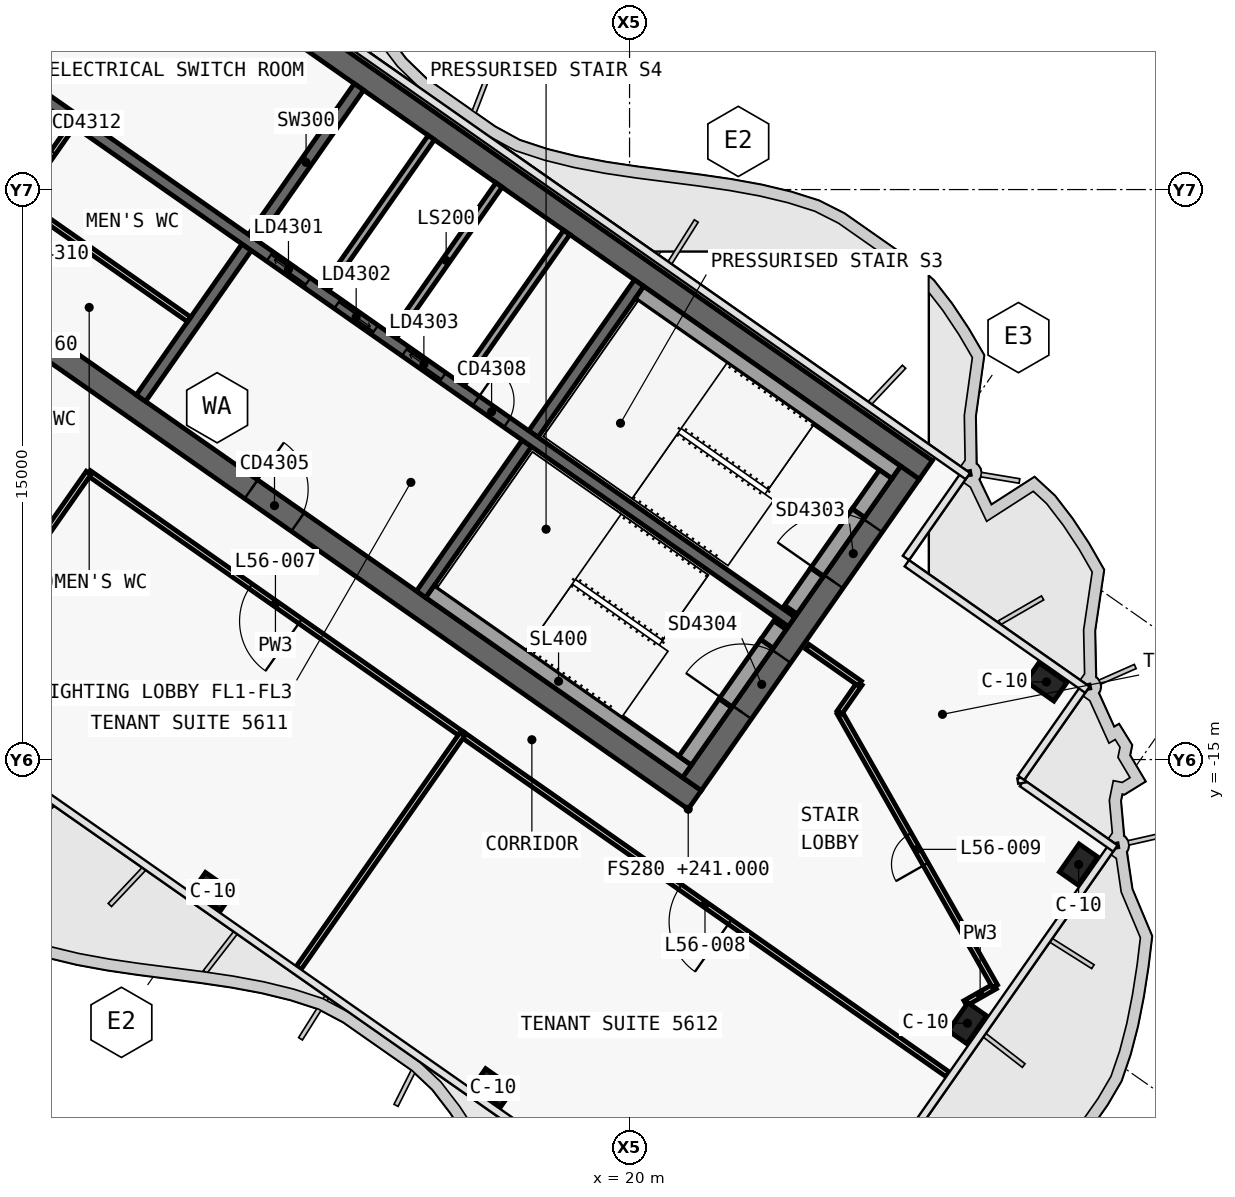
"""IFC4 building model, lengths in metres.
Left out: names, types, materials, properties, quantities, classifications, styles, units other than length and angle.
Written with IfcOpenShell. Run it as: python <this file> out.ifc"""

import sys

from ifc_helpers import new_model, si_unit, direction, frame, frame_2d, origin, origin_2d, place, context, subcontext, project, spatial, polyline, rectangle, outline, extrude, element, fill, save


model = new_model("IFC4")
c1 = context("Model", 3, precision=1e-05, world=origin(), true_north=direction((0.0, 1.0)))
c2 = subcontext(c1, "Body", "Model", "MODEL_VIEW")
j1 = project(units=[si_unit("LENGTHUNIT", "METRE"), si_unit("PLANEANGLEUNIT", "RADIAN")], contexts=[c1])
p1 = place(None, origin())
s1 = spatial("IfcSite", under=j1, at=p1, CompositionType="ELEMENT")
p2 = place(p1, origin())
s2 = spatial("IfcBuilding", under=s1, at=p2, CompositionType="ELEMENT")
p3 = place(p2, frame((0.0, 0.0, 241.0)))
s3 = spatial("IfcBuildingStorey", under=s2, at=p3, CompositionType="ELEMENT", Elevation=241.0)
p4 = place(p3, frame((0.028, 12.066, 0.0), z_axis=(0.0, 0.0, 1.0), x_axis=(0.819151382952, -0.573577380837, 0.0)))
e1 = element("IfcWall", 1, at=p4, inside=s3, PredefinedType="SHEAR", context=c2, shape_type="SweptSolid", body=[
    extrude(outline(polyline([(33.898, 0.3), (0.0, 0.3), (0.42, -0.3), (33.898, -0.3), (33.898, 0.3)])), origin(), (0.0, 0.0, 1.0), 3.9),
])
p5 = place(p3, frame((0.028, -0.874, 0.0), z_axis=(0.0, 0.0, 1.0), x_axis=(0.819150035022, -0.573579305871, 0.0)))
e2 = element("IfcWall", 2, at=p5, inside=s3, PredefinedType="SHEAR", context=c2, shape_type="SweptSolid", body=[
    extrude(outline(polyline([(26.476, 0.3), (0.0, 0.3), (0.42, -0.3), (26.476, -0.3), (26.476, 0.3)])), origin(), (0.0, 0.0, 1.0), 3.9),
])
p6 = place(p5, frame((0.826, 0.0, 0.0)))
e3 = element("IfcOpeningElement", 3, at=p6, cuts=e2, PredefinedType="OPENING", context=c2, shape_type="SweptSolid", body=[
    extrude(rectangle(XDim=1.5, YDim=2.1, at=frame_2d((0.75, 1.05))), frame((0.0, 0.31, 0.0), z_axis=(0.0, -1.0, 0.0), x_axis=(1.0, 0.0, 0.0)), (0.0, 0.0, 1.0), 0.62),
])
p7 = place(p5, frame((12.226, 0.0, 0.0)))
e4 = element("IfcOpeningElement", 4, at=p7, cuts=e2, PredefinedType="OPENING", context=c2, shape_type="SweptSolid", body=[
    extrude(rectangle(XDim=1.5, YDim=2.1, at=frame_2d((0.75, 1.05))), frame((0.0, 0.31, 0.0), z_axis=(0.0, -1.0, 0.0), x_axis=(1.0, 0.0, 0.0)), (0.0, 0.0, 1.0), 0.62),
])
p8 = place(p3, frame((21.642, -15.642, 0.0), z_axis=(0.0, 0.0, 1.0), x_axis=(0.573586866468, 0.819144740944, 0.0)))
e5 = element("IfcWall", 5, at=p8, inside=s3, PredefinedType="SHEAR", context=c2, shape_type="SweptSolid", body=[
    extrude(outline(polyline([(10.0, 0.3), (0.0, 0.3), (0.0, -0.3), (10.0, -0.3), (10.0, 0.3)])), origin(), (0.0, 0.0, 1.0), 3.9),
])
p9 = place(p8, frame((6.5, 0.0, 0.0)))
e6 = element("IfcOpeningElement", 6, at=p9, cuts=e5, PredefinedType="OPENING", context=c2, shape_type="SweptSolid", body=[
    extrude(rectangle(XDim=1.8, YDim=2.1, at=frame_2d((0.9, 1.05))), frame((0.0, 0.31, 0.0), z_axis=(0.0, -1.0, 0.0), x_axis=(1.0, 0.0, 0.0)), (0.0, 0.0, 1.0), 0.62),
])
p10 = place(p8, frame((2.3, 0.0, 0.0)))
e7 = element("IfcOpeningElement", 7, at=p10, cuts=e5, PredefinedType="OPENING", context=c2, shape_type="SweptSolid", body=[
    extrude(rectangle(XDim=1.8, YDim=2.1, at=frame_2d((0.9, 1.05))), frame((0.0, 0.31, 0.0), z_axis=(0.0, -1.0, 0.0), x_axis=(1.0, 0.0, 0.0)), (0.0, 0.0, 1.0), 0.62),
])
p11 = place(p3, frame((7.143, -5.49, 0.0), z_axis=(0.0, 0.0, 1.0), x_axis=(0.573617744349, 0.819123118565, 0.0)))
e8 = element("IfcWall", 8, at=p11, inside=s3, PredefinedType="SHEAR", context=c2, shape_type="SweptSolid", body=[
    extrude(outline(polyline([(0.0, 0.15), (0.0, -0.15), (4.85, -0.15), (4.85, 0.15), (0.0, 0.15)])), origin(), (0.0, 0.0, 1.0), 3.9),
])
p12 = place(p3, frame((10.097, -1.271, 0.0), z_axis=(0.0, 0.0, 1.0), x_axis=(0.573560315113, 0.819163332265, 0.0)))
e9 = element("IfcWall", 9, at=p12, inside=s3, PredefinedType="SHEAR", context=c2, shape_type="SweptSolid", body=[
    extrude(outline(polyline([(4.85, -0.15), (4.85, 0.15), (0.0, 0.15), (0.0, -0.15), (4.85, -0.15)])), origin(), (0.0, 0.0, 1.0), 3.9),
])
p13 = place(p3, frame((14.515, -10.652, 0.0), z_axis=(0.0, 0.0, 1.0), x_axis=(0.573560315113, 0.819163332265, 0.0)))
e10 = element("IfcWall", 10, at=p13, inside=s3, PredefinedType="SHEAR", context=c2, shape_type="SweptSolid", body=[
    extrude(outline(polyline([(0.0, 0.15), (0.0, -0.15), (4.85, -0.15), (4.85, 0.15), (0.0, 0.15)])), origin(), (0.0, 0.0, 1.0), 3.9),
])
p14 = place(p3, frame((17.469, -6.433, 0.0), z_axis=(0.0, 0.0, 1.0), x_axis=(0.573594092424, 0.81913968109, 0.0)))
e11 = element("IfcWall", 11, at=p14, inside=s3, PredefinedType="SHEAR", context=c2, shape_type="SweptSolid", body=[
    extrude(outline(polyline([(4.85, -0.15), (4.85, 0.15), (0.0, 0.15), (0.0, -0.15), (4.85, -0.15)])), origin(), (0.0, 0.0, 1.0), 3.9),
])
p15 = place(p3, frame((2.638, 3.768, 0.0), z_axis=(0.0, 0.0, 1.0), x_axis=(0.819155014212, -0.573572194837, 0.0)))
e12 = element("IfcWall", 12, at=p15, inside=s3, PredefinedType="SHEAR", context=c2, shape_type="SweptSolid", body=[
    extrude(outline(polyline([(0.0, 0.15), (0.0, -0.15), (26.4, -0.15), (26.4, 0.15), (0.0, 0.15)])), origin(), (0.0, 0.0, 1.0), 3.9),
])
p16 = place(p15, frame((9.637, 0.0, 0.0)))
e13 = element("IfcOpeningElement", 13, at=p16, cuts=e12, PredefinedType="OPENING", context=c2, shape_type="SweptSolid", body=[
    extrude(rectangle(XDim=1.2, YDim=2.1, at=frame_2d((0.6, 1.05))), frame((0.0, 0.16, 0.0), z_axis=(0.0, -1.0, 0.0), x_axis=(1.0, 0.0, 0.0)), (0.0, 0.0, 1.0), 0.32),
])
p17 = place(p15, frame((11.812, 0.0, 0.0)))
e14 = element("IfcOpeningElement", 14, at=p17, cuts=e12, PredefinedType="OPENING", context=c2, shape_type="SweptSolid", body=[
    extrude(rectangle(XDim=1.2, YDim=2.1, at=frame_2d((0.6, 1.05))), frame((0.0, 0.16, 0.0), z_axis=(0.0, -1.0, 0.0), x_axis=(1.0, 0.0, 0.0)), (0.0, 0.0, 1.0), 0.32),
])
p18 = place(p15, frame((13.988, 0.0, 0.0)))
e15 = element("IfcOpeningElement", 15, at=p18, cuts=e12, PredefinedType="OPENING", context=c2, shape_type="SweptSolid", body=[
    extrude(rectangle(XDim=1.2, YDim=2.1, at=frame_2d((0.6, 1.05))), frame((0.0, 0.16, 0.0), z_axis=(0.0, -1.0, 0.0), x_axis=(1.0, 0.0, 0.0)), (0.0, 0.0, 1.0), 0.32),
])
p19 = place(p15, frame((16.262, 0.0, 0.0)))
e16 = element("IfcOpeningElement", 16, at=p19, cuts=e12, PredefinedType="OPENING", context=c2, shape_type="SweptSolid", body=[
    extrude(rectangle(XDim=1.0, YDim=2.1, at=frame_2d((0.5, 1.05))), frame((0.0, 0.16, 0.0), z_axis=(0.0, -1.0, 0.0), x_axis=(1.0, 0.0, 0.0)), (0.0, 0.0, 1.0), 0.32),
])
for number, where, z_axis, x_axis in (
    (17, (9.038, -18.475, 0.0), (0.0, 0.0, 1.0), (0.819, -0.574, 0.0)),
    (18, (16.41, -23.637, 0.0), (0.0, 0.0, 1.0), (0.819, -0.574, 0.0)),
    (19, (30.969, -12.956, 0.0), (0.0, 0.0, 1.0), (0.819, -0.574, 0.0)),
    (20, (28.891, -21.939, 0.0), (0.0, 0.0, 1.0), (0.574, 0.819, 0.0)),
    (21, (31.816, -17.761, 0.0), (0.0, 0.0, 1.0), (0.574, 0.819, 0.0)),
):
    element("IfcColumn", number, at=place(p3, frame(where, z_axis=z_axis, x_axis=x_axis)), inside=s3, PredefinedType="COLUMN", context=c2, shape_type="SweptSolid", body=[
        extrude(rectangle(XDim=0.9, YDim=0.6, at=origin_2d()), origin(), (0.0, 0.0, 1.0), 3.9),
    ])
p20 = place(p3, frame((12.001, -2.605, 0.0), z_axis=(0.0, 0.0, 1.0), x_axis=(0.573560315113, 0.819163332265, 0.0)))
e22 = element("IfcWall", 22, at=p20, inside=s3, PredefinedType="SOLIDWALL", context=c2, shape_type="SweptSolid", body=[
    extrude(rectangle(XDim=4.85, YDim=0.2, at=frame_2d((2.425, 0.0))), origin(), (0.0, 0.0, 1.0), 3.9),
])
p21 = place(p3, frame((13.783, -3.852, 0.0), z_axis=(0.0, 0.0, 1.0), x_axis=(0.573594092424, 0.81913968109, 0.0)))
e23 = element("IfcWall", 23, at=p21, inside=s3, PredefinedType="SOLIDWALL", context=c2, shape_type="SweptSolid", body=[
    extrude(rectangle(XDim=4.85, YDim=0.2, at=frame_2d((2.425, 0.0))), origin(), (0.0, 0.0, 1.0), 3.9),
])
p22 = place(p3, frame((15.565, -5.1, 0.0), z_axis=(0.0, 0.0, 1.0), x_axis=(0.573560315113, 0.819163332265, 0.0)))
e24 = element("IfcWall", 24, at=p22, inside=s3, PredefinedType="SOLIDWALL", context=c2, shape_type="SweptSolid", body=[
    extrude(rectangle(XDim=4.85, YDim=0.2, at=frame_2d((2.425, 0.0))), origin(), (0.0, 0.0, 1.0), 3.9),
])
p23 = place(p3, frame((2.556, -2.278, 0.0), z_axis=(0.0, 0.0, 1.0), x_axis=(0.573560315113, 0.819163332265, 0.0)))
e25 = element("IfcWall", 25, at=p23, inside=s3, PredefinedType="PARTITIONING", context=c2, shape_type="SweptSolid", body=[
    extrude(rectangle(XDim=4.85, YDim=0.15, at=frame_2d((2.425, 0.0))), origin(), (0.0, 0.0, 1.0), 3.62),
])
p24 = place(p23, frame((0.55, 0.0, 0.0)))
e26 = element("IfcOpeningElement", 26, at=p24, cuts=e25, PredefinedType="OPENING", context=c2, shape_type="SweptSolid", body=[
    extrude(rectangle(XDim=0.9, YDim=2.1, at=frame_2d((0.45, 1.05))), frame((0.0, 0.085, 0.0), z_axis=(0.0, -1.0, 0.0), x_axis=(1.0, 0.0, 0.0)), (0.0, 0.0, 1.0), 0.17),
])
p25 = place(p23, frame((3.075, 0.0, 0.0)))
e27 = element("IfcOpeningElement", 27, at=p25, cuts=e25, PredefinedType="OPENING", context=c2, shape_type="SweptSolid", body=[
    extrude(rectangle(XDim=0.9, YDim=2.1, at=frame_2d((0.45, 1.05))), frame((0.0, 0.085, 0.0), z_axis=(0.0, -1.0, 0.0), x_axis=(1.0, 0.0, 0.0)), (0.0, 0.0, 1.0), 0.17),
])
p26 = place(p3, frame((3.947, -0.292, 0.0), z_axis=(0.0, 0.0, 1.0), x_axis=(0.819151939971, -0.573576585332, 0.0)))
e28 = element("IfcWall", 28, at=p26, inside=s3, PredefinedType="PARTITIONING", context=c2, shape_type="SweptSolid", body=[
    extrude(rectangle(XDim=5.45, YDim=0.15, at=frame_2d((2.725, 0.0))), origin(), (0.0, 0.0, 1.0), 3.62),
])
p27 = place(p3, frame((20.259, -2.71, 0.0), z_axis=(0.0, 0.0, 1.0), x_axis=(0.81914849389, -0.573581506813, 0.0)))
e29 = element("IfcWall", 29, at=p27, inside=s3, PredefinedType="SOLIDWALL", context=c2, shape_type="SweptSolid", body=[
    extrude(rectangle(XDim=8.25, YDim=0.4, at=frame_2d((4.125, 0.0))), origin(), (0.0, 0.0, 1.0), 3.62),
])
p28 = place(p3, frame((24.244, -11.055, 0.0), z_axis=(0.0, 0.0, 1.0), x_axis=(0.573571582932, 0.819155442668, 0.0)))
e30 = element("IfcWall", 30, at=p28, inside=s3, PredefinedType="SOLIDWALL", context=c2, shape_type="SweptSolid", body=[
    extrude(rectangle(XDim=1.2, YDim=0.4, at=frame_2d((0.6, 0.0))), origin(), (0.0, 0.0, 1.0), 3.62),
])
p29 = place(p3, frame((26.022, -8.515, 0.0), z_axis=(0.0, 0.0, 1.0), x_axis=(0.573619628835, 0.819121798889, 0.0)))
e31 = element("IfcWall", 31, at=p29, inside=s3, PredefinedType="SOLIDWALL", context=c2, shape_type="SweptSolid", body=[
    extrude(rectangle(XDim=1.25, YDim=0.4, at=frame_2d((0.625, 0.0))), origin(), (0.0, 0.0, 1.0), 3.62),
])
p30 = place(p3, frame((24.932, -10.072, 2.15), z_axis=(0.0, 0.0, 1.0), x_axis=(0.573591692345, 0.819141361715, 0.0)))
e32 = element("IfcWall", 32, at=p30, inside=s3, PredefinedType="SOLIDWALL", context=c2, shape_type="SweptSolid", body=[
    extrude(rectangle(XDim=1.9, YDim=0.4, at=frame_2d((0.95, 0.0))), origin(), (0.0, 0.0, 1.0), 1.47),
])
p31 = place(p3, frame((14.753, -10.574, 0.0), z_axis=(0.0, 0.0, 1.0), x_axis=(0.819158229677, -0.573567602601, 0.0)))
e33 = element("IfcWall", 33, at=p31, inside=s3, PredefinedType="SOLIDWALL", context=c2, shape_type="SweptSolid", body=[
    extrude(rectangle(XDim=8.25, YDim=0.4, at=frame_2d((4.125, 0.0))), origin(), (0.0, 0.0, 1.0), 3.62),
])
p32 = place(p3, frame((21.462, -15.028, 0.0), z_axis=(0.0, 0.0, 1.0), x_axis=(0.573559770908, 0.819163713305, 0.0)))
e34 = element("IfcWall", 34, at=p32, inside=s3, PredefinedType="SOLIDWALL", context=c2, shape_type="SweptSolid", body=[
    extrude(rectangle(XDim=1.85, YDim=0.4, at=frame_2d((0.925, 0.0))), origin(), (0.0, 0.0, 1.0), 3.62),
])
p33 = place(p3, frame((23.613, -11.956, 0.0), z_axis=(0.0, 0.0, 1.0), x_axis=(0.573435029941, 0.819251039936, 0.0)))
e35 = element("IfcWall", 35, at=p33, inside=s3, PredefinedType="SOLIDWALL", context=c2, shape_type="SweptSolid", body=[
    extrude(rectangle(XDim=0.6, YDim=0.4, at=frame_2d((0.3, 0.0))), origin(), (0.0, 0.0, 1.0), 3.62),
])
p34 = place(p3, frame((22.523, -13.512, 2.15), z_axis=(0.0, 0.0, 1.0), x_axis=(0.573591692345, 0.819141361715, 0.0)))
e36 = element("IfcWall", 36, at=p34, inside=s3, PredefinedType="SOLIDWALL", context=c2, shape_type="SweptSolid", body=[
    extrude(rectangle(XDim=1.9, YDim=0.4, at=frame_2d((0.95, 0.0))), origin(), (0.0, 0.0, 1.0), 1.47),
])
p35 = place(p3, frame((3.298, 3.49, 0.0), z_axis=(0.0, 0.0, 1.0), x_axis=(0.573560315113, 0.819163332265, 0.0)))
e37 = element("IfcWall", 37, at=p35, inside=s3, PredefinedType="SOLIDWALL", context=c2, shape_type="SweptSolid", body=[
    extrude(rectangle(XDim=4.85, YDim=0.2, at=frame_2d((2.425, 0.0))), origin(), (0.0, 0.0, 1.0), 3.62),
])
p36 = place(p35, frame((0.7, 0.0, 0.0)))
e38 = element("IfcOpeningElement", 38, at=p36, cuts=e37, PredefinedType="OPENING", context=c2, shape_type="SweptSolid", body=[
    extrude(rectangle(XDim=1.0, YDim=2.1, at=frame_2d((0.5, 1.05))), frame((0.0, 0.11, 0.0), z_axis=(0.0, -1.0, 0.0), x_axis=(1.0, 0.0, 0.0)), (0.0, 0.0, 1.0), 0.22),
])
p37 = place(p3, frame((15.598, -14.34, 0.0), z_axis=(0.0, 0.0, 1.0), x_axis=(-0.81915546166, 0.573571555809, 0.0)))
e39 = element("IfcWall", 39, at=p37, inside=s3, PredefinedType="PARTITIONING", context=c2, shape_type="SweptSolid", body=[
    extrude(rectangle(XDim=12.002, YDim=0.15, at=frame_2d((6.001, 0.0))), origin(), (0.0, 0.0, 1.0), 3.05),
])
p38 = place(p37, frame((5.201, 0.0, 0.0)))
e40 = element("IfcOpeningElement", 40, at=p38, cuts=e39, PredefinedType="OPENING", context=c2, shape_type="SweptSolid", body=[
    extrude(rectangle(XDim=1.6, YDim=2.1, at=frame_2d((0.8, 1.05))), frame((0.0, 0.085, 0.0), z_axis=(0.0, -1.0, 0.0), x_axis=(1.0, 0.0, 0.0)), (0.0, 0.0, 1.0), 0.17),
])
p39 = place(p3, frame((28.375, -23.287, 0.0), z_axis=(0.0, 0.0, 1.0), x_axis=(-0.819153253106, 0.573574709977, 0.0)))
e41 = element("IfcWall", 41, at=p39, inside=s3, PredefinedType="PARTITIONING", context=c2, shape_type="SweptSolid", body=[
    extrude(rectangle(XDim=15.602, YDim=0.15, at=frame_2d((7.801, 0.0))), origin(), (0.0, 0.0, 1.0), 3.0),
])
p40 = place(p39, frame((7.001, 0.0, 0.0)))
e42 = element("IfcOpeningElement", 42, at=p40, cuts=e41, PredefinedType="OPENING", context=c2, shape_type="SweptSolid", body=[
    extrude(rectangle(XDim=1.6, YDim=2.1, at=frame_2d((0.8, 1.05))), frame((0.0, 0.085, 0.0), z_axis=(0.0, -1.0, 0.0), x_axis=(1.0, 0.0, 0.0)), (0.0, 0.0, 1.0), 0.17),
])
p41 = place(p3, frame((28.834, -21.411, 0.0), z_axis=(0.0, 0.0, 1.0), x_axis=(0.869525386045, 0.493888249529, 0.0)))
e43 = element("IfcWall", 43, at=p41, inside=s3, PredefinedType="PARTITIONING", context=c2, shape_type="SweptSolid", body=[
    extrude(rectangle(XDim=0.9, YDim=0.15, at=frame_2d((0.45, 0.0))), origin(), (0.0, 0.0, 1.0), 3.0),
])
p42 = place(p3, frame((29.617, -20.966, 0.0), z_axis=(0.0, 0.0, 1.0), x_axis=(-0.493827705015, 0.86955977239, 0.0)))
e44 = element("IfcWall", 44, at=p42, inside=s3, PredefinedType="PARTITIONING", context=c2, shape_type="SweptSolid", body=[
    extrude(rectangle(XDim=8.288, YDim=0.15, at=frame_2d((4.144, 0.0))), origin(), (0.0, 0.0, 1.0), 3.0),
])
p43 = place(p42, frame((3.694, 0.0, 0.0)))
e45 = element("IfcOpeningElement", 45, at=p43, cuts=e44, PredefinedType="OPENING", context=c2, shape_type="SweptSolid", body=[
    extrude(rectangle(XDim=0.9, YDim=2.1, at=frame_2d((0.45, 1.05))), frame((0.0, 0.085, 0.0), z_axis=(0.0, -1.0, 0.0), x_axis=(1.0, 0.0, 0.0)), (0.0, 0.0, 1.0), 0.17),
])
p44 = place(p3, frame((25.524, -13.759, 0.0), z_axis=(0.0, 0.0, 1.0), x_axis=(0.573497542524, 0.81920728068, 0.0)))
e46 = element("IfcWall", 46, at=p44, inside=s3, PredefinedType="PARTITIONING", context=c2, shape_type="SweptSolid", body=[
    extrude(rectangle(XDim=0.931, YDim=0.15, at=frame_2d((0.465, 0.0))), origin(), (0.0, 0.0, 1.0), 3.62),
])
p45 = place(p3, frame((26.058, -12.997, 0.0), z_axis=(0.0, 0.0, 1.0), x_axis=(-0.819109000826, 0.573637903879, 0.0)))
e47 = element("IfcWall", 47, at=p45, inside=s3, PredefinedType="PARTITIONING", context=c2, shape_type="SweptSolid", body=[
    extrude(rectangle(XDim=1.68, YDim=0.15, at=frame_2d((0.84, 0.0))), origin(), (0.0, 0.0, 1.0), 3.62),
])
p46 = place(p3, frame((15.596, -14.339, 0.0), z_axis=(0.0, 0.0, 1.0), x_axis=(-0.573560650686, -0.819163097304, 0.0)))
e48 = element("IfcWall", 48, at=p46, inside=s3, PredefinedType="PARTITIONING", context=c2, shape_type="SweptSolid", body=[
    extrude(rectangle(XDim=7.5, YDim=0.15, at=frame_2d((3.75, 0.0))), origin(), (0.0, 0.0, 1.0), 3.0),
])
p47 = place(p3, frame((1.849, -13.051, 0.0), z_axis=(0.0, 0.0, 1.0), x_axis=(0.573577493031, 0.819151304393, 0.0)))
e49 = element("IfcWall", 49, at=p47, inside=s3, PredefinedType="PARTITIONING", context=c2, shape_type="SweptSolid", body=[
    extrude(rectangle(XDim=6.83, YDim=0.15, at=frame_2d((3.415, 0.0))), origin(), (0.0, 0.0, 1.0), 3.05),
])
p48 = place(p16, origin())
e50 = element("IfcDoor", 50, at=p48, inside=s3, OperationType="SLIDING_TO_LEFT", PredefinedType="DOOR", context=c2, shape_type="SweptSolid", body=[
    extrude(rectangle(XDim=1.2, YDim=2.1, at=frame_2d((0.6, 1.05))), frame((0.0, 0.025, 0.0), z_axis=(0.0, -1.0, 0.0), x_axis=(1.0, 0.0, 0.0)), (0.0, 0.0, 1.0), 0.05),
])
fill(e13, e50)
p49 = place(p17, origin())
e51 = element("IfcDoor", 51, at=p49, inside=s3, OperationType="SLIDING_TO_RIGHT", PredefinedType="DOOR", context=c2, shape_type="SweptSolid", body=[
    extrude(rectangle(XDim=1.2, YDim=2.1, at=frame_2d((0.6, 1.05))), frame((0.0, 0.025, 0.0), z_axis=(0.0, -1.0, 0.0), x_axis=(1.0, 0.0, 0.0)), (0.0, 0.0, 1.0), 0.05),
])
fill(e14, e51)
p50 = place(p18, origin())
e52 = element("IfcDoor", 52, at=p50, inside=s3, OperationType="SLIDING_TO_LEFT", PredefinedType="DOOR", context=c2, shape_type="SweptSolid", body=[
    extrude(rectangle(XDim=1.2, YDim=2.1, at=frame_2d((0.6, 1.05))), frame((0.0, 0.025, 0.0), z_axis=(0.0, -1.0, 0.0), x_axis=(1.0, 0.0, 0.0)), (0.0, 0.0, 1.0), 0.05),
])
fill(e15, e52)
p51 = place(p19, origin())
e53 = element("IfcDoor", 53, at=p51, inside=s3, OperationType="SINGLE_SWING_RIGHT", PredefinedType="DOOR", context=c2, shape_type="SweptSolid", body=[
    extrude(rectangle(XDim=1.0, YDim=2.1, at=frame_2d((0.5, 1.05))), frame((0.0, 0.025, 0.0), z_axis=(0.0, -1.0, 0.0), x_axis=(1.0, 0.0, 0.0)), (0.0, 0.0, 1.0), 0.05),
])
fill(e16, e53)
p52 = place(p25, origin())
e54 = element("IfcDoor", 54, at=p52, inside=s3, OperationType="SINGLE_SWING_RIGHT", PredefinedType="DOOR", context=c2, shape_type="SweptSolid", body=[
    extrude(rectangle(XDim=0.9, YDim=2.1, at=frame_2d((0.45, 1.05))), frame((0.0, 0.025, 0.0), z_axis=(0.0, -1.0, 0.0), x_axis=(1.0, 0.0, 0.0)), (0.0, 0.0, 1.0), 0.05),
])
fill(e27, e54)
p53 = place(p7, origin())
e55 = element("IfcDoor", 55, at=p53, inside=s3, OperationType="DOUBLE_DOOR_SINGLE_SWING", PredefinedType="DOOR", context=c2, shape_type="SweptSolid", body=[
    extrude(rectangle(XDim=1.5, YDim=2.1, at=frame_2d((0.75, 1.05))), frame((0.0, 0.025, 0.0), z_axis=(0.0, -1.0, 0.0), x_axis=(1.0, 0.0, 0.0)), (0.0, 0.0, 1.0), 0.05),
])
fill(e4, e55)
p54 = place(p9, origin())
e56 = element("IfcDoor", 56, at=p54, inside=s3, OperationType="DOUBLE_DOOR_SINGLE_SWING", PredefinedType="DOOR", context=c2, shape_type="SweptSolid", body=[
    extrude(rectangle(XDim=1.8, YDim=2.1, at=frame_2d((0.9, 1.05))), frame((0.0, 0.025, 0.0), z_axis=(0.0, -1.0, 0.0), x_axis=(1.0, 0.0, 0.0)), (0.0, 0.0, 1.0), 0.05),
])
fill(e6, e56)
p55 = place(p10, origin())
e57 = element("IfcDoor", 57, at=p55, inside=s3, OperationType="DOUBLE_DOOR_SINGLE_SWING", PredefinedType="DOOR", context=c2, shape_type="SweptSolid", body=[
    extrude(rectangle(XDim=1.8, YDim=2.1, at=frame_2d((0.9, 1.05))), frame((0.0, 0.025, 0.0), z_axis=(0.0, -1.0, 0.0), x_axis=(1.0, 0.0, 0.0)), (0.0, 0.0, 1.0), 0.05),
])
fill(e7, e57)
p56 = place(p38, origin())
e58 = element("IfcDoor", 58, at=p56, inside=s3, OperationType="DOUBLE_DOOR_SINGLE_SWING", PredefinedType="DOOR", context=c2, shape_type="SweptSolid", body=[
    extrude(rectangle(XDim=1.6, YDim=2.1, at=frame_2d((0.8, 1.05))), frame((0.0, 0.025, 0.0), z_axis=(0.0, -1.0, 0.0), x_axis=(1.0, 0.0, 0.0)), (0.0, 0.0, 1.0), 0.05),
])
fill(e40, e58)
p57 = place(p40, origin())
e59 = element("IfcDoor", 59, at=p57, inside=s3, OperationType="DOUBLE_DOOR_SINGLE_SWING", PredefinedType="DOOR", context=c2, shape_type="SweptSolid", body=[
    extrude(rectangle(XDim=1.6, YDim=2.1, at=frame_2d((0.8, 1.05))), frame((0.0, 0.025, 0.0), z_axis=(0.0, -1.0, 0.0), x_axis=(1.0, 0.0, 0.0)), (0.0, 0.0, 1.0), 0.05),
])
fill(e42, e59)
p58 = place(p43, origin())
e60 = element("IfcDoor", 60, at=p58, inside=s3, OperationType="SINGLE_SWING_RIGHT", PredefinedType="DOOR", context=c2, shape_type="SweptSolid", body=[
    extrude(rectangle(XDim=0.9, YDim=2.1, at=frame_2d((0.45, 1.05))), frame((0.0, 0.025, 0.0), z_axis=(0.0, -1.0, 0.0), x_axis=(1.0, 0.0, 0.0)), (0.0, 0.0, 1.0), 0.05),
])
fill(e45, e60)
save(model, sys.argv[1])
